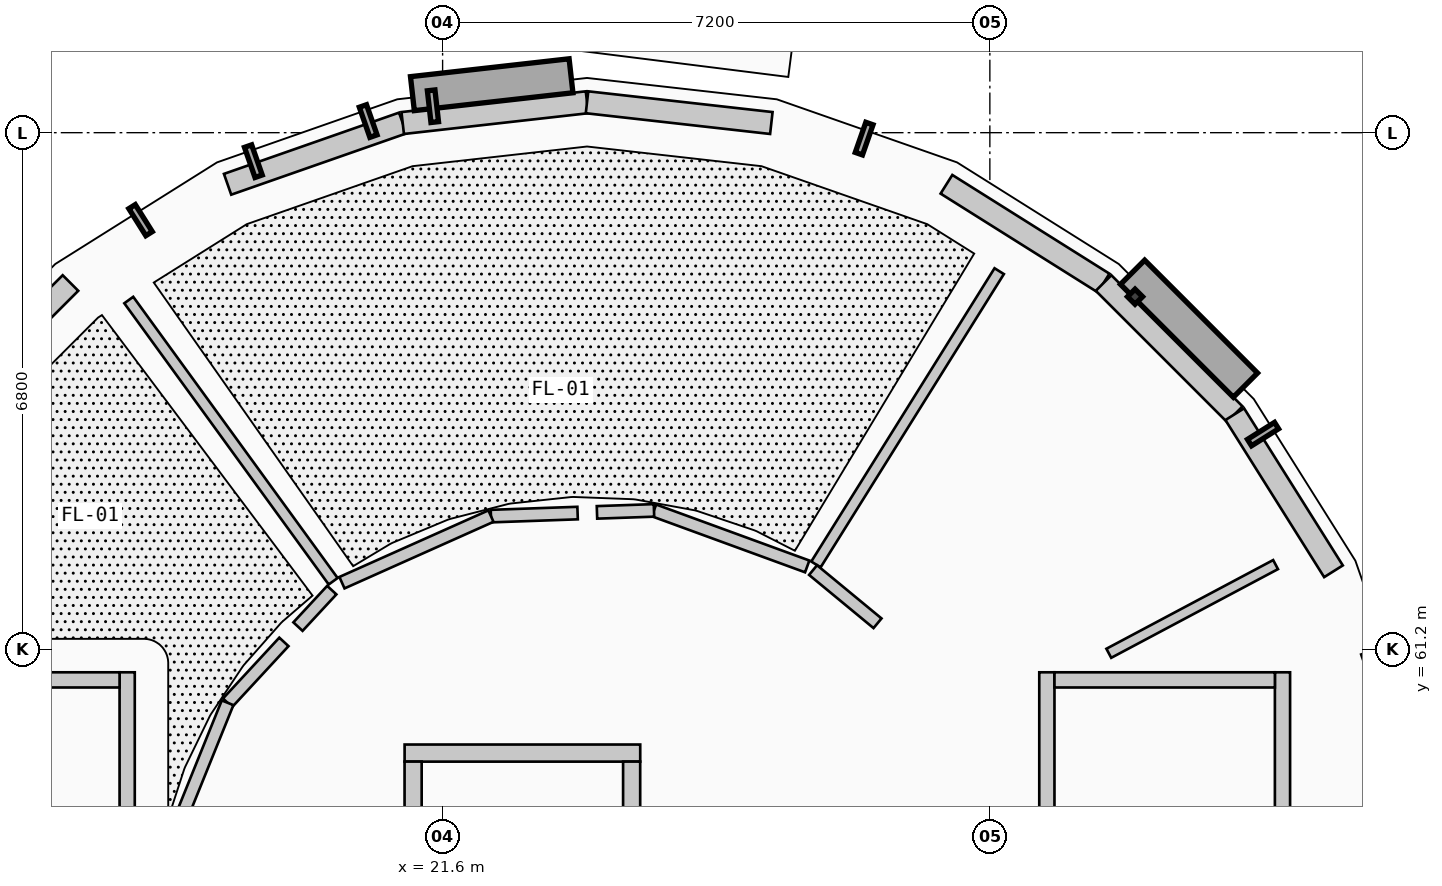
"""IFC4 building model, lengths in metres.
Left out: names, types, materials, properties, quantities, classifications, styles, units other than length and angle.
Written with IfcOpenShell. Run it as: python <this file> out.ifc"""

import sys

from ifc_helpers import new_model, si_unit, direction, frame, frame_2d, origin, origin_2d, place, context, subcontext, project, spatial, rectangle, circle, extrude, element, fill, save


model = new_model("IFC4")
c1 = context("Model", 3, precision=1e-05, world=origin(), true_north=direction((0.0, 1.0)))
c2 = subcontext(c1, "Body", "Model", "MODEL_VIEW")
j1 = project(units=[si_unit("LENGTHUNIT", "METRE"), si_unit("PLANEANGLEUNIT", "RADIAN")], contexts=[c1])
p1 = place(None, origin())
s1 = spatial("IfcSite", under=j1, at=p1, CompositionType="ELEMENT")
p2 = place(p1, origin())
s2 = spatial("IfcBuilding", under=s1, at=p2, CompositionType="ELEMENT")
p3 = place(p2, frame((0.0, 0.0, 4.55)))
s3 = spatial("IfcBuildingStorey", under=s2, at=p3, CompositionType="ELEMENT", Elevation=4.55)
for number, where, z_axis, x_axis in (
    (1, (32.852, 62.004, 0.0), (0.0, 0.0, 1.0), (1.0, 0.0, 0.0)),
    (2, (29.972, 65.615, 0.0), (0.0, 0.0, 1.0), (1.0, 0.0, 0.0)),
    (3, (25.81, 67.62, 0.0), (0.0, 0.0, 1.0), (1.0, 0.0, 0.0)),
    (4, (21.19, 67.62, 0.0), (0.0, 0.0, 1.0), (1.0, 0.0, 0.0)),
    (5, (17.028, 65.615, 0.0), (0.0, 0.0, 1.0), (1.0, 0.0, 0.0)),
    (6, (27.46, 61.46, 0.0), (0.0, 0.0, 1.0), (1.0, 0.0, 0.0)),
    (7, (23.5, 63.1, 0.0), (0.0, 0.0, 1.0), (1.0, 0.0, 0.0)),
    (8, (19.54, 61.46, 0.0), (0.0, 0.0, 1.0), (1.0, 0.0, 0.0)),
):
    element("IfcColumn", number, at=place(p3, frame(where, z_axis=z_axis, x_axis=x_axis)), inside=s3, PredefinedType="COLUMN", context=c2, shape_type="SweptSolid", body=[
        extrude(rectangle(XDim=0.315, YDim=0.315, at=origin_2d()), origin(), (0.0, 0.0, 1.0), 4.2),
    ])
for number, where, z_axis, x_axis in (
    (9, (25.966, 68.887, 0.0), (0.0, 0.0, 1.0), (1.0, 0.0, 0.0)),
    (10, (31.387, 67.39, 0.0), (0.0, 0.0, 1.0), (1.0, 0.0, 0.0)),
):
    element("IfcColumn", number, at=place(p3, frame(where, z_axis=z_axis, x_axis=x_axis)), inside=s3, PredefinedType="PILASTER", context=c2, shape_type="SweptSolid", body=[
        extrude(circle(Radius=0.19, at=origin_2d()), origin(), (0.0, 0.0, 1.0), 4.2),
    ])
p4 = place(p3, frame((14.978, 64.296, 0.0), z_axis=(0.0, 0.0, 1.0), x_axis=(0.707106781187, 0.707106781187, 0.0)))
e11 = element("IfcWall", 11, at=p4, inside=s3, PredefinedType="ELEMENTEDWALL", context=c2, shape_type="SweptSolid", body=[
    extrude(rectangle(XDim=2.441, YDim=0.29, at=frame_2d((1.22, 0.0))), origin(), (0.0, 0.0, 1.0), 3.314),
])
p5 = place(p4, frame((0.66, 0.0, 0.85)))
e12 = element("IfcOpeningElement", 12, at=p5, cuts=e11, PredefinedType="OPENING", context=c2, shape_type="SweptSolid", body=[
    extrude(rectangle(XDim=1.12, YDim=1.65, at=frame_2d((0.56, 0.825))), frame((0.0, 0.155, 0.0), z_axis=(0.0, -1.0, 0.0), x_axis=(1.0, 0.0, 0.0)), (0.0, 0.0, 1.0), 0.31),
])
p6 = place(p3, frame((18.771, 67.321, 0.0), z_axis=(0.0, 0.0, 1.0), x_axis=(0.943919156274, 0.330176659411, 0.0)))
e13 = element("IfcWall", 13, at=p6, inside=s3, PredefinedType="ELEMENTEDWALL", context=c2, shape_type="SweptSolid", body=[
    extrude(rectangle(XDim=2.441, YDim=0.29, at=frame_2d((1.22, 0.0))), origin(), (0.0, 0.0, 1.0), 3.314),
])
p7 = place(p6, frame((0.645, 0.0, 0.85)))
e14 = element("IfcOpeningElement", 14, at=p7, cuts=e13, PredefinedType="OPENING", context=c2, shape_type="SweptSolid", body=[
    extrude(rectangle(XDim=1.15, YDim=1.4, at=frame_2d((0.575, 0.7))), frame((0.0, 0.155, 0.0), z_axis=(0.0, -1.0, 0.0), x_axis=(1.0, 0.0, 0.0)), (0.0, 0.0, 1.0), 0.31),
])
p8 = place(p3, frame((21.075, 68.127, 0.0), z_axis=(0.0, 0.0, 1.0), x_axis=(0.993725340882, 0.111847873866, 0.0)))
e15 = element("IfcWall", 15, at=p8, inside=s3, PredefinedType="ELEMENTEDWALL", context=c2, shape_type="SweptSolid", body=[
    extrude(rectangle(XDim=2.44, YDim=0.29, at=frame_2d((1.22, 0.0))), origin(), (0.0, 0.0, 1.0), 3.314),
])
p9 = place(p8, frame((0.645, 0.0, 0.85)))
e16 = element("IfcOpeningElement", 16, at=p9, cuts=e15, PredefinedType="OPENING", context=c2, shape_type="SweptSolid", body=[
    extrude(rectangle(XDim=1.15, YDim=1.7, at=frame_2d((0.575, 0.85))), frame((0.0, 0.155, 0.0), z_axis=(0.0, -1.0, 0.0), x_axis=(1.0, 0.0, 0.0)), (0.0, 0.0, 1.0), 0.31),
])
p10 = place(p3, frame((23.5, 68.4, 0.0), z_axis=(0.0, 0.0, 1.0), x_axis=(0.993725340882, -0.111847873866, 0.0)))
e17 = element("IfcWall", 17, at=p10, inside=s3, PredefinedType="ELEMENTEDWALL", context=c2, shape_type="SweptSolid", body=[
    extrude(rectangle(XDim=2.44, YDim=0.29, at=frame_2d((1.22, 0.0))), origin(), (0.0, 0.0, 1.0), 3.314),
])
p11 = place(p10, frame((0.645, 0.0, 0.85)))
e18 = element("IfcOpeningElement", 18, at=p11, cuts=e17, PredefinedType="OPENING", context=c2, shape_type="SweptSolid", body=[
    extrude(rectangle(XDim=1.15, YDim=2.0, at=frame_2d((0.575, 1.0))), frame((0.0, 0.155, 0.0), z_axis=(0.0, -1.0, 0.0), x_axis=(1.0, 0.0, 0.0)), (0.0, 0.0, 1.0), 0.31),
])
p12 = place(p3, frame((28.229, 67.321, 0.0), z_axis=(0.0, 0.0, 1.0), x_axis=(0.846658434148, -0.532136726684, 0.0)))
e19 = element("IfcWall", 19, at=p12, inside=s3, PredefinedType="ELEMENTEDWALL", context=c2, shape_type="SweptSolid", body=[
    extrude(rectangle(XDim=2.441, YDim=0.29, at=frame_2d((1.221, 0.0))), origin(), (0.0, 0.0, 1.0), 3.314),
])
p13 = place(p12, frame((0.646, 0.0, 0.85)))
e20 = element("IfcOpeningElement", 20, at=p13, cuts=e19, PredefinedType="OPENING", context=c2, shape_type="SweptSolid", body=[
    extrude(rectangle(XDim=1.15, YDim=2.25, at=frame_2d((0.575, 1.125))), frame((0.0, 0.155, 0.0), z_axis=(0.0, -1.0, 0.0), x_axis=(1.0, 0.0, 0.0)), (0.0, 0.0, 1.0), 0.31),
])
p14 = place(p3, frame((30.296, 66.022, 0.0), z_axis=(0.0, 0.0, 1.0), x_axis=(0.707106781187, -0.707106781187, 0.0)))
e21 = element("IfcWall", 21, at=p14, inside=s3, PredefinedType="ELEMENTEDWALL", context=c2, shape_type="SweptSolid", body=[
    extrude(rectangle(XDim=2.441, YDim=0.29, at=frame_2d((1.22, 0.0))), origin(), (0.0, 0.0, 1.0), 3.314),
])
p15 = place(p14, frame((0.63, 0.0, 0.85)))
e22 = element("IfcOpeningElement", 22, at=p15, cuts=e21, PredefinedType="OPENING", context=c2, shape_type="SweptSolid", body=[
    extrude(rectangle(XDim=1.18, YDim=1.55, at=frame_2d((0.59, 0.775))), frame((0.0, 0.155, 0.0), z_axis=(0.0, -1.0, 0.0), x_axis=(1.0, 0.0, 0.0)), (0.0, 0.0, 1.0), 0.31),
])
p16 = place(p3, frame((32.022, 64.296, 0.0), z_axis=(0.0, 0.0, 1.0), x_axis=(0.532136726684, -0.846658434148, 0.0)))
e23 = element("IfcWall", 23, at=p16, inside=s3, PredefinedType="ELEMENTEDWALL", context=c2, shape_type="SweptSolid", body=[
    extrude(rectangle(XDim=2.441, YDim=0.29, at=frame_2d((1.221, 0.0))), origin(), (0.0, 0.0, 1.0), 3.314),
])
p17 = place(p16, frame((0.631, 0.0, 0.85)))
e24 = element("IfcOpeningElement", 24, at=p17, cuts=e23, PredefinedType="OPENING", context=c2, shape_type="SweptSolid", body=[
    extrude(rectangle(XDim=1.18, YDim=1.85, at=frame_2d((0.59, 0.925))), frame((0.0, 0.155, 0.0), z_axis=(0.0, -1.0, 0.0), x_axis=(1.0, 0.0, 0.0)), (0.0, 0.0, 1.0), 0.31),
])
p18 = place(p3, frame((29.55, 60.9, 0.0), z_axis=(0.0, 0.0, 1.0), x_axis=(0.0, -1.0, 0.0)))
e25 = element("IfcWall", 25, at=p18, inside=s3, PredefinedType="SHEAR", context=c2, shape_type="SweptSolid", body=[
    extrude(rectangle(XDim=6.8, YDim=0.2, at=frame_2d((3.4, 0.0))), origin(), (0.0, 0.0, 1.0), 3.96),
])
p19 = place(p18, frame((0.38, 0.0, 0.0)))
e26 = element("IfcOpeningElement", 26, at=p19, cuts=e25, PredefinedType="OPENING", context=c2, shape_type="SweptSolid", body=[
    extrude(rectangle(XDim=1.1, YDim=2.15, at=frame_2d((0.55, 1.075))), frame((0.0, 0.11, 0.0), z_axis=(0.0, -1.0, 0.0), x_axis=(1.0, 0.0, 0.0)), (0.0, 0.0, 1.0), 0.22),
])
p20 = place(p3, frame((32.65, 60.9, 0.0), z_axis=(0.0, 0.0, 1.0), x_axis=(0.0, -1.0, 0.0)))
e27 = element("IfcWall", 27, at=p20, inside=s3, PredefinedType="SHEAR", context=c2, shape_type="SweptSolid", body=[
    extrude(rectangle(XDim=6.8, YDim=0.2, at=frame_2d((3.4, 0.0))), origin(), (0.0, 0.0, 1.0), 3.96),
])
p21 = place(p3, frame((29.65, 60.8, 0.0), z_axis=(0.0, 0.0, 1.0), x_axis=(1.0, 0.0, 0.0)))
e28 = element("IfcWall", 28, at=p21, inside=s3, PredefinedType="SHEAR", context=c2, shape_type="SweptSolid", body=[
    extrude(rectangle(XDim=2.9, YDim=0.2, at=frame_2d((1.45, 0.0))), origin(), (0.0, 0.0, 1.0), 3.96),
])
p22 = place(p3, frame((17.45, 54.1, 0.0), z_axis=(0.0, 0.0, 1.0), x_axis=(0.0, 1.0, 0.0)))
e29 = element("IfcWall", 29, at=p22, inside=s3, PredefinedType="SHEAR", context=c2, shape_type="SweptSolid", body=[
    extrude(rectangle(XDim=6.8, YDim=0.2, at=frame_2d((3.4, 0.0))), origin(), (0.0, 0.0, 1.0), 3.96),
])
p23 = place(p22, frame((0.38, 0.0, 0.0)))
e30 = element("IfcOpeningElement", 30, at=p23, cuts=e29, PredefinedType="OPENING", context=c2, shape_type="SweptSolid", body=[
    extrude(rectangle(XDim=1.1, YDim=2.15, at=frame_2d((0.55, 1.075))), frame((0.0, 0.11, 0.0), z_axis=(0.0, -1.0, 0.0), x_axis=(1.0, 0.0, 0.0)), (0.0, 0.0, 1.0), 0.22),
])
p24 = place(p3, frame((17.35, 60.8, 0.0), z_axis=(0.0, 0.0, 1.0), x_axis=(-1.0, 0.0, 0.0)))
e31 = element("IfcWall", 31, at=p24, inside=s3, PredefinedType="SHEAR", context=c2, shape_type="SweptSolid", body=[
    extrude(rectangle(XDim=2.9, YDim=0.2, at=frame_2d((1.45, 0.0))), origin(), (0.0, 0.0, 1.0), 3.96),
])
p25 = place(p3, frame((21.1, 59.837, 0.0), z_axis=(0.0, 0.0, 1.0), x_axis=(1.0, 0.0, 0.0)))
e32 = element("IfcWall", 32, at=p25, inside=s3, PredefinedType="SHEAR", context=c2, shape_type="SweptSolid", body=[
    extrude(rectangle(XDim=3.1, YDim=0.225, at=frame_2d((1.55, 0.0))), origin(), (0.0, 0.0, 1.0), 3.96),
])
for number, where, z_axis, x_axis in (
    (33, (21.212, 57.575, 0.0), (0.0, 0.0, 1.0), (0.0, 1.0, 0.0)),
    (34, (24.087, 57.575, 0.0), (0.0, 0.0, 1.0), (0.0, 1.0, 0.0)),
):
    element("IfcWall", number, at=place(p3, frame(where, z_axis=z_axis, x_axis=x_axis)), inside=s3, PredefinedType="SHEAR", context=c2, shape_type="SweptSolid", body=[
        extrude(rectangle(XDim=2.15, YDim=0.225, at=frame_2d((1.075, 0.0))), origin(), (0.0, 0.0, 1.0), 3.96),
    ])
p26 = place(p3, frame((26.512, 62.319, 0.0), z_axis=(0.0, 0.0, 1.0), x_axis=(0.529892832375, 0.848064612042, 0.0)))
e35 = element("IfcWall", 35, at=p26, inside=s3, PredefinedType="PARTITIONING", context=c2, shape_type="SweptSolid", body=[
    extrude(rectangle(XDim=4.55, YDim=0.145, at=frame_2d((2.275, 0.0))), origin(), (0.0, 0.0, 1.0), 3.279),
])
p27 = place(p3, frame((20.16, 62.098, 0.0), z_axis=(0.0, 0.0, 1.0), x_axis=(-0.587873334136, 0.808952991843, 0.0)))
e36 = element("IfcWall", 36, at=p27, inside=s3, PredefinedType="PARTITIONING", context=c2, shape_type="SweptSolid", body=[
    extrude(rectangle(XDim=4.574, YDim=0.145, at=frame_2d((2.287, 0.0))), origin(), (0.0, 0.0, 1.0), 3.279),
])
p28 = place(p3, frame((30.365, 61.15, 0.0), z_axis=(0.0, 0.0, 1.0), x_axis=(0.882885388192, 0.469588534056, 0.0)))
e37 = element("IfcWall", 37, at=p28, inside=s3, PredefinedType="PLUMBINGWALL", context=c2, shape_type="SweptSolid", body=[
    extrude(rectangle(XDim=2.485, YDim=0.135, at=frame_2d((1.243, 0.0))), origin(), (0.0, 0.0, 1.0), 3.279),
])
p29 = place(p3, frame((26.397, 62.293, 0.0), z_axis=(0.0, 0.0, 1.0), x_axis=(-0.939190865756, 0.34339557027, 0.0)))
e38 = element("IfcWall", 38, at=p29, inside=s3, PredefinedType="PARTITIONING", context=c2, shape_type="SweptSolid", body=[
    extrude(rectangle(XDim=2.146, YDim=0.165, at=frame_2d((1.073, 0.0))), origin(), (0.0, 0.0, 1.0), 3.279),
])
p30 = place(p29, frame((0.533, 0.0, 0.0)))
e39 = element("IfcOpeningElement", 39, at=p30, cuts=e38, PredefinedType="OPENING", context=c2, shape_type="SweptSolid", body=[
    extrude(rectangle(XDim=1.08, YDim=2.16, at=frame_2d((0.54, 1.08))), frame((0.0, 0.093, 0.0), z_axis=(0.0, -1.0, 0.0), x_axis=(1.0, 0.0, 0.0)), (0.0, 0.0, 1.0), 0.185),
])
p31 = place(p3, frame((24.381, 63.03, 0.0), z_axis=(0.0, 0.0, 1.0), x_axis=(-0.999393961522, -0.034809620405, 0.0)))
e40 = element("IfcWall", 40, at=p31, inside=s3, PredefinedType="PARTITIONING", context=c2, shape_type="SweptSolid", body=[
    extrude(rectangle(XDim=0.75, YDim=0.165, at=frame_2d((0.375, 0.0))), origin(), (0.0, 0.0, 1.0), 3.279),
])
p32 = place(p3, frame((23.376, 62.995, 0.0), z_axis=(0.0, 0.0, 1.0), x_axis=(-0.999383677093, -0.035103645972, 0.0)))
e41 = element("IfcWall", 41, at=p32, inside=s3, PredefinedType="PARTITIONING", context=c2, shape_type="SweptSolid", body=[
    extrude(rectangle(XDim=1.141, YDim=0.165, at=frame_2d((0.57, 0.0))), origin(), (0.0, 0.0, 1.0), 3.279),
])
p33 = place(p3, frame((22.236, 62.955, 0.0), z_axis=(0.0, 0.0, 1.0), x_axis=(-0.912984379162, -0.407994513941, 0.0)))
e42 = element("IfcWall", 42, at=p33, inside=s3, PredefinedType="PARTITIONING", context=c2, shape_type="SweptSolid", body=[
    extrude(rectangle(XDim=2.147, YDim=0.165, at=frame_2d((1.073, 0.0))), origin(), (0.0, 0.0, 1.0), 3.279),
])
p34 = place(p3, frame((20.142, 61.981, 0.0), z_axis=(0.0, 0.0, 1.0), x_axis=(-0.679935917373, -0.73327153788, 0.0)))
e43 = element("IfcWall", 43, at=p34, inside=s3, PredefinedType="PARTITIONING", context=c2, shape_type="SweptSolid", body=[
    extrude(rectangle(XDim=0.655, YDim=0.165, at=frame_2d((0.327, 0.0))), origin(), (0.0, 0.0, 1.0), 3.279),
])
p35 = place(p3, frame((19.512, 61.3, 0.0), z_axis=(0.0, 0.0, 1.0), x_axis=(-0.679051024612, -0.734091074713, 0.0)))
e44 = element("IfcWall", 44, at=p35, inside=s3, PredefinedType="PARTITIONING", context=c2, shape_type="SweptSolid", body=[
    extrude(rectangle(XDim=1.091, YDim=0.165, at=frame_2d((0.545, 0.0))), origin(), (0.0, 0.0, 1.0), 3.279),
])
p36 = place(p3, frame((18.771, 60.499, 0.0), z_axis=(0.0, 0.0, 1.0), x_axis=(-0.374663065009, -0.927161036562, 0.0)))
e45 = element("IfcWall", 45, at=p36, inside=s3, PredefinedType="PARTITIONING", context=c2, shape_type="SweptSolid", body=[
    extrude(rectangle(XDim=2.018, YDim=0.165, at=frame_2d((1.009, 0.0))), origin(), (0.0, 0.0, 1.0), 3.279),
])
p37 = place(p36, frame((0.449, 0.0, 0.0)))
e46 = element("IfcOpeningElement", 46, at=p37, cuts=e45, PredefinedType="OPENING", context=c2, shape_type="SweptSolid", body=[
    extrude(rectangle(XDim=1.12, YDim=2.16, at=frame_2d((0.56, 1.08))), frame((0.0, 0.093, 0.0), z_axis=(0.0, -1.0, 0.0), x_axis=(1.0, 0.0, 0.0)), (0.0, 0.0, 1.0), 0.185),
])
p38 = place(p3, frame((27.322, 61.545, 0.0), z_axis=(0.0, 0.0, 1.0), x_axis=(-0.771070753982, 0.636749473775, 0.0)))
e47 = element("IfcWall", 47, at=p38, inside=s3, PredefinedType="PARTITIONING", context=c2, shape_type="SweptSolid", body=[
    extrude(rectangle(XDim=1.1, YDim=0.165, at=frame_2d((0.55, 0.0))), origin(), (0.0, 0.0, 1.0), 3.279),
])
p39 = place(p7, origin())
e48 = element("IfcWindow", 48, at=p39, inside=s3, PartitioningType="SINGLE_PANEL", PredefinedType="WINDOW", context=c2, shape_type="SweptSolid", body=[
    extrude(rectangle(XDim=1.15, YDim=1.4, at=frame_2d((0.575, 0.7))), frame((0.0, 0.03, 0.0), z_axis=(0.0, -1.0, 0.0), x_axis=(1.0, 0.0, 0.0)), (0.0, 0.0, 1.0), 0.06),
])
fill(e14, e48)
p40 = place(p9, origin())
e49 = element("IfcWindow", 49, at=p40, inside=s3, PartitioningType="SINGLE_PANEL", PredefinedType="WINDOW", context=c2, shape_type="SweptSolid", body=[
    extrude(rectangle(XDim=1.15, YDim=1.7, at=frame_2d((0.575, 0.85))), frame((0.0, 0.03, 0.0), z_axis=(0.0, -1.0, 0.0), x_axis=(1.0, 0.0, 0.0)), (0.0, 0.0, 1.0), 0.06),
])
fill(e16, e49)
p41 = place(p11, origin())
e50 = element("IfcWindow", 50, at=p41, inside=s3, PartitioningType="SINGLE_PANEL", PredefinedType="WINDOW", context=c2, shape_type="SweptSolid", body=[
    extrude(rectangle(XDim=1.15, YDim=2.0, at=frame_2d((0.575, 1.0))), frame((0.0, 0.03, 0.0), z_axis=(0.0, -1.0, 0.0), x_axis=(1.0, 0.0, 0.0)), (0.0, 0.0, 1.0), 0.06),
])
fill(e18, e50)
p42 = place(p13, origin())
e51 = element("IfcWindow", 51, at=p42, inside=s3, PartitioningType="SINGLE_PANEL", PredefinedType="WINDOW", context=c2, shape_type="SweptSolid", body=[
    extrude(rectangle(XDim=1.15, YDim=2.25, at=frame_2d((0.575, 1.125))), frame((0.0, 0.03, 0.0), z_axis=(0.0, -1.0, 0.0), x_axis=(1.0, 0.0, 0.0)), (0.0, 0.0, 1.0), 0.06),
])
fill(e20, e51)
p43 = place(p15, origin())
e52 = element("IfcWindow", 52, at=p43, inside=s3, PartitioningType="SINGLE_PANEL", PredefinedType="WINDOW", context=c2, shape_type="SweptSolid", body=[
    extrude(rectangle(XDim=1.18, YDim=1.55, at=frame_2d((0.59, 0.775))), frame((0.0, 0.03, 0.0), z_axis=(0.0, -1.0, 0.0), x_axis=(1.0, 0.0, 0.0)), (0.0, 0.0, 1.0), 0.06),
])
fill(e22, e52)
p44 = place(p17, origin())
e53 = element("IfcWindow", 53, at=p44, inside=s3, PartitioningType="SINGLE_PANEL", PredefinedType="WINDOW", context=c2, shape_type="SweptSolid", body=[
    extrude(rectangle(XDim=1.18, YDim=1.85, at=frame_2d((0.59, 0.925))), frame((0.0, 0.03, 0.0), z_axis=(0.0, -1.0, 0.0), x_axis=(1.0, 0.0, 0.0)), (0.0, 0.0, 1.0), 0.06),
])
fill(e24, e53)
p45 = place(p19, origin())
e54 = element("IfcDoor", 54, at=p45, inside=s3, OperationType="SINGLE_SWING_LEFT", PredefinedType="DOOR", context=c2, shape_type="SweptSolid", body=[
    extrude(rectangle(XDim=1.1, YDim=2.15, at=frame_2d((0.55, 1.075))), frame((0.0, 0.025, 0.0), z_axis=(0.0, -1.0, 0.0), x_axis=(1.0, 0.0, 0.0)), (0.0, 0.0, 1.0), 0.05),
])
fill(e26, e54)
p46 = place(p30, origin())
e55 = element("IfcDoor", 55, at=p46, inside=s3, OperationType="SINGLE_SWING_RIGHT", PredefinedType="DOOR", context=c2, shape_type="SweptSolid", body=[
    extrude(rectangle(XDim=1.08, YDim=2.16, at=frame_2d((0.54, 1.08))), frame((0.0, 0.025, 0.0), z_axis=(0.0, -1.0, 0.0), x_axis=(1.0, 0.0, 0.0)), (0.0, 0.0, 1.0), 0.05),
])
fill(e39, e55)
p47 = place(p37, origin())
e56 = element("IfcDoor", 56, at=p47, inside=s3, OperationType="SINGLE_SWING_LEFT", PredefinedType="DOOR", context=c2, shape_type="SweptSolid", body=[
    extrude(rectangle(XDim=1.12, YDim=2.16, at=frame_2d((0.56, 1.08))), frame((0.0, 0.025, 0.0), z_axis=(0.0, -1.0, 0.0), x_axis=(1.0, 0.0, 0.0)), (0.0, 0.0, 1.0), 0.05),
])
fill(e46, e56)
save(model, sys.argv[1])
